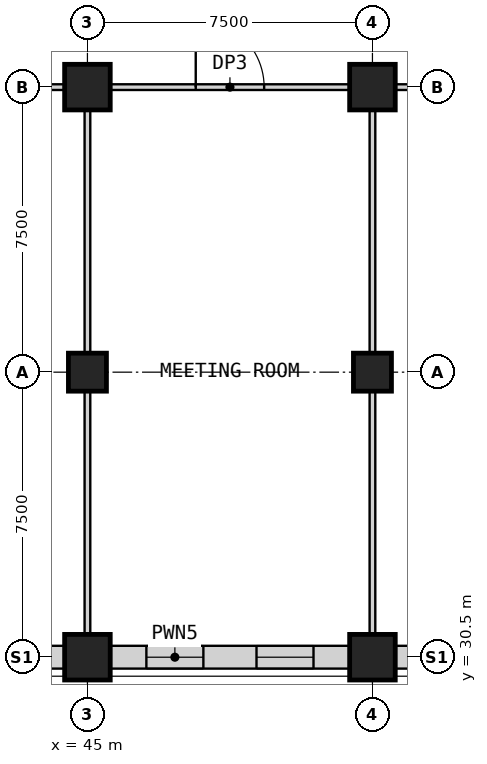
"""IFC4 building model, lengths in metres.
Left out: names, types, materials, properties, quantities, classifications, styles, units other than length and angle.
Written with IfcOpenShell. Run it as: python <this file> out.ifc"""

import sys

from ifc_helpers import new_model, si_unit, direction, frame, frame_2d, origin, origin_2d, place, context, subcontext, project, spatial, rectangle, extrude, element, fill, save


model = new_model("IFC4")
c1 = context("Model", 3, precision=1e-05, world=origin(), true_north=direction((0.0, 1.0)))
c2 = subcontext(c1, "Body", "Model", "MODEL_VIEW")
j1 = project(units=[si_unit("LENGTHUNIT", "METRE"), si_unit("PLANEANGLEUNIT", "RADIAN")], contexts=[c1])
p1 = place(None, origin())
s1 = spatial("IfcSite", under=j1, at=p1, CompositionType="ELEMENT")
p2 = place(p1, origin())
s2 = spatial("IfcBuilding", under=s1, at=p2, CompositionType="ELEMENT")
p3 = place(p2, frame((0.0, 0.0, 23.5)))
s3 = spatial("IfcBuildingStorey", under=s2, at=p3, CompositionType="ELEMENT", Elevation=23.5)
p4 = place(p3, frame((45.0, 38.0, 0.0), z_axis=(0.0, 0.0, 1.0), x_axis=(1.0, 0.0, 0.0)))
e1 = element("IfcColumn", 1, at=p4, inside=s3, PredefinedType="COLUMN", context=c2, shape_type="SweptSolid", body=[
    extrude(rectangle(XDim=1.0, YDim=1.0, at=origin_2d()), origin(), (0.0, 0.0, 1.0), 5.5),
])
p5 = place(p3, frame((45.0, 45.5, 0.0), z_axis=(0.0, 0.0, 1.0), x_axis=(1.0, 0.0, 0.0)))
e2 = element("IfcColumn", 2, at=p5, inside=s3, PredefinedType="COLUMN", context=c2, shape_type="SweptSolid", body=[
    extrude(rectangle(XDim=1.2, YDim=1.2, at=origin_2d()), origin(), (0.0, 0.0, 1.0), 5.5),
])
p6 = place(p3, frame((52.5, 38.0, 0.0), z_axis=(0.0, 0.0, 1.0), x_axis=(1.0, 0.0, 0.0)))
e3 = element("IfcColumn", 3, at=p6, inside=s3, PredefinedType="COLUMN", context=c2, shape_type="SweptSolid", body=[
    extrude(rectangle(XDim=1.0, YDim=1.0, at=origin_2d()), origin(), (0.0, 0.0, 1.0), 5.5),
])
for number, where, z_axis, x_axis in (
    (4, (52.5, 45.5, 0.0), (0.0, 0.0, 1.0), (1.0, 0.0, 0.0)),
    (5, (45.0, 30.5, 0.0), (0.0, 0.0, 1.0), (1.0, 0.0, 0.0)),
    (6, (52.5, 30.5, 0.0), (0.0, 0.0, 1.0), (1.0, 0.0, 0.0)),
):
    element("IfcColumn", number, at=place(p3, frame(where, z_axis=z_axis, x_axis=x_axis)), inside=s3, PredefinedType="COLUMN", context=c2, shape_type="SweptSolid", body=[
        extrude(rectangle(XDim=1.2, YDim=1.2, at=origin_2d()), origin(), (0.0, 0.0, 1.0), 5.5),
    ])
p7 = place(p3, frame((41.25, 30.5, 0.0), z_axis=(0.0, 0.0, 1.0), x_axis=(1.0, 0.0, 0.0)))
e7 = element("IfcWall", 7, at=p7, inside=s3, PredefinedType="PARTITIONING", context=c2, shape_type="SweptSolid", body=[
    extrude(rectangle(XDim=3.15, YDim=0.6, at=frame_2d((1.575, 0.0))), origin(), (0.0, 0.0, 1.0), 4.6),
])
p8 = place(p7, frame((0.975, 0.0, 0.9)))
e8 = element("IfcOpeningElement", 8, at=p8, cuts=e7, PredefinedType="OPENING", context=c2, shape_type="SweptSolid", body=[
    extrude(rectangle(XDim=1.2, YDim=2.8, at=frame_2d((0.6, 1.4))), frame((0.0, 0.31, 0.0), z_axis=(0.0, -1.0, 0.0), x_axis=(1.0, 0.0, 0.0)), (0.0, 0.0, 1.0), 0.62),
])
p9 = place(p3, frame((45.6, 30.5, 0.0), z_axis=(0.0, 0.0, 1.0), x_axis=(1.0, 0.0, 0.0)))
e9 = element("IfcWall", 9, at=p9, inside=s3, PredefinedType="PARTITIONING", context=c2, shape_type="SweptSolid", body=[
    extrude(rectangle(XDim=6.3, YDim=0.6, at=frame_2d((3.15, 0.0))), origin(), (0.0, 0.0, 1.0), 4.6),
])
p10 = place(p9, frame((0.951, 0.0, 0.9)))
e10 = element("IfcOpeningElement", 10, at=p10, cuts=e9, PredefinedType="OPENING", context=c2, shape_type="SweptSolid", body=[
    extrude(rectangle(XDim=1.5, YDim=2.8, at=frame_2d((0.75, 1.4))), frame((0.0, 0.31, 0.0), z_axis=(0.0, -1.0, 0.0), x_axis=(1.0, 0.0, 0.0)), (0.0, 0.0, 1.0), 0.62),
])
p11 = place(p9, frame((3.849, 0.0, 0.9)))
e11 = element("IfcOpeningElement", 11, at=p11, cuts=e9, PredefinedType="OPENING", context=c2, shape_type="SweptSolid", body=[
    extrude(rectangle(XDim=1.5, YDim=2.8, at=frame_2d((0.75, 1.4))), frame((0.0, 0.31, 0.0), z_axis=(0.0, -1.0, 0.0), x_axis=(1.0, 0.0, 0.0)), (0.0, 0.0, 1.0), 0.62),
])
p12 = place(p3, frame((53.1, 30.5, 0.0), z_axis=(0.0, 0.0, 1.0), x_axis=(1.0, 0.0, 0.0)))
e12 = element("IfcWall", 12, at=p12, inside=s3, PredefinedType="PARTITIONING", context=c2, shape_type="SweptSolid", body=[
    extrude(rectangle(XDim=6.3, YDim=0.6, at=frame_2d((3.15, 0.0))), origin(), (0.0, 0.0, 1.0), 4.6),
])
p13 = place(p12, frame((0.951, 0.0, 0.9)))
e13 = element("IfcOpeningElement", 13, at=p13, cuts=e12, PredefinedType="OPENING", context=c2, shape_type="SweptSolid", body=[
    extrude(rectangle(XDim=1.5, YDim=2.8, at=frame_2d((0.75, 1.4))), frame((0.0, 0.31, 0.0), z_axis=(0.0, -1.0, 0.0), x_axis=(1.0, 0.0, 0.0)), (0.0, 0.0, 1.0), 0.62),
])
p14 = place(p12, frame((3.849, 0.0, 0.9)))
e14 = element("IfcOpeningElement", 14, at=p14, cuts=e12, PredefinedType="OPENING", context=c2, shape_type="SweptSolid", body=[
    extrude(rectangle(XDim=1.5, YDim=2.8, at=frame_2d((0.75, 1.4))), frame((0.0, 0.31, 0.0), z_axis=(0.0, -1.0, 0.0), x_axis=(1.0, 0.0, 0.0)), (0.0, 0.0, 1.0), 0.62),
])
p15 = place(p3, frame((41.325, 45.5, 0.0), z_axis=(0.0, 0.0, 1.0), x_axis=(1.0, 0.0, 0.0)))
e15 = element("IfcWall", 15, at=p15, inside=s3, PredefinedType="PARTITIONING", context=c2, shape_type="SweptSolid", body=[
    extrude(rectangle(XDim=3.075, YDim=0.15, at=frame_2d((1.538, 0.0))), origin(), (0.0, 0.0, 1.0), 5.2),
])
p16 = place(p15, frame((0.75, 0.0, 0.0)))
e16 = element("IfcOpeningElement", 16, at=p16, cuts=e15, PredefinedType="OPENING", context=c2, shape_type="SweptSolid", body=[
    extrude(rectangle(XDim=1.8, YDim=2.4, at=frame_2d((0.9, 1.2))), frame((0.0, 0.085, 0.0), z_axis=(0.0, -1.0, 0.0), x_axis=(1.0, 0.0, 0.0)), (0.0, 0.0, 1.0), 0.17),
])
p17 = place(p3, frame((45.6, 45.5, 0.0), z_axis=(0.0, 0.0, 1.0), x_axis=(1.0, 0.0, 0.0)))
e17 = element("IfcWall", 17, at=p17, inside=s3, PredefinedType="PARTITIONING", context=c2, shape_type="SweptSolid", body=[
    extrude(rectangle(XDim=6.3, YDim=0.15, at=frame_2d((3.15, 0.0))), origin(), (0.0, 0.0, 1.0), 5.2),
])
p18 = place(p17, frame((2.25, 0.0, 0.0)))
e18 = element("IfcOpeningElement", 18, at=p18, cuts=e17, PredefinedType="OPENING", context=c2, shape_type="SweptSolid", body=[
    extrude(rectangle(XDim=1.8, YDim=2.4, at=frame_2d((0.9, 1.2))), frame((0.0, 0.085, 0.0), z_axis=(0.0, -1.0, 0.0), x_axis=(1.0, 0.0, 0.0)), (0.0, 0.0, 1.0), 0.17),
])
p19 = place(p3, frame((53.1, 45.5, 0.0), z_axis=(0.0, 0.0, 1.0), x_axis=(1.0, 0.0, 0.0)))
e19 = element("IfcWall", 19, at=p19, inside=s3, PredefinedType="PARTITIONING", context=c2, shape_type="SweptSolid", body=[
    extrude(rectangle(XDim=6.3, YDim=0.15, at=frame_2d((3.15, 0.0))), origin(), (0.0, 0.0, 1.0), 5.2),
])
for number, where, z_axis, x_axis in (
    (20, (45.0, 31.1, 0.0), (0.0, 0.0, 1.0), (0.0, 1.0, 0.0)),
    (21, (45.0, 38.5, 0.0), (0.0, 0.0, 1.0), (0.0, 1.0, 0.0)),
    (22, (52.5, 31.1, 0.0), (0.0, 0.0, 1.0), (0.0, 1.0, 0.0)),
    (23, (52.5, 38.5, 0.0), (0.0, 0.0, 1.0), (0.0, 1.0, 0.0)),
):
    element("IfcWall", number, at=place(p3, frame(where, z_axis=z_axis, x_axis=x_axis)), inside=s3, PredefinedType="PARTITIONING", context=c2, shape_type="SweptSolid", body=[
        extrude(rectangle(XDim=6.4, YDim=0.15, at=frame_2d((3.2, 0.0))), origin(), (0.0, 0.0, 1.0), 5.2),
    ])
p20 = place(p10, origin())
e24 = element("IfcWindow", 24, at=p20, inside=s3, PartitioningType="SINGLE_PANEL", PredefinedType="WINDOW", context=c2, shape_type="SweptSolid", body=[
    extrude(rectangle(XDim=1.5, YDim=2.8, at=frame_2d((0.75, 1.4))), frame((0.0, 0.03, 0.0), z_axis=(0.0, -1.0, 0.0), x_axis=(1.0, 0.0, 0.0)), (0.0, 0.0, 1.0), 0.06),
])
fill(e10, e24)
p21 = place(p11, origin())
e25 = element("IfcWindow", 25, at=p21, inside=s3, PartitioningType="SINGLE_PANEL", PredefinedType="WINDOW", context=c2, shape_type="SweptSolid", body=[
    extrude(rectangle(XDim=1.5, YDim=2.8, at=frame_2d((0.75, 1.4))), frame((0.0, 0.03, 0.0), z_axis=(0.0, -1.0, 0.0), x_axis=(1.0, 0.0, 0.0)), (0.0, 0.0, 1.0), 0.06),
])
fill(e11, e25)
p22 = place(p18, origin())
e26 = element("IfcDoor", 26, at=p22, inside=s3, OperationType="SINGLE_SWING_LEFT", PredefinedType="DOOR", context=c2, shape_type="SweptSolid", body=[
    extrude(rectangle(XDim=1.8, YDim=2.4, at=frame_2d((0.9, 1.2))), frame((0.0, 0.025, 0.0), z_axis=(0.0, -1.0, 0.0), x_axis=(1.0, 0.0, 0.0)), (0.0, 0.0, 1.0), 0.05),
])
fill(e18, e26)
save(model, sys.argv[1])
